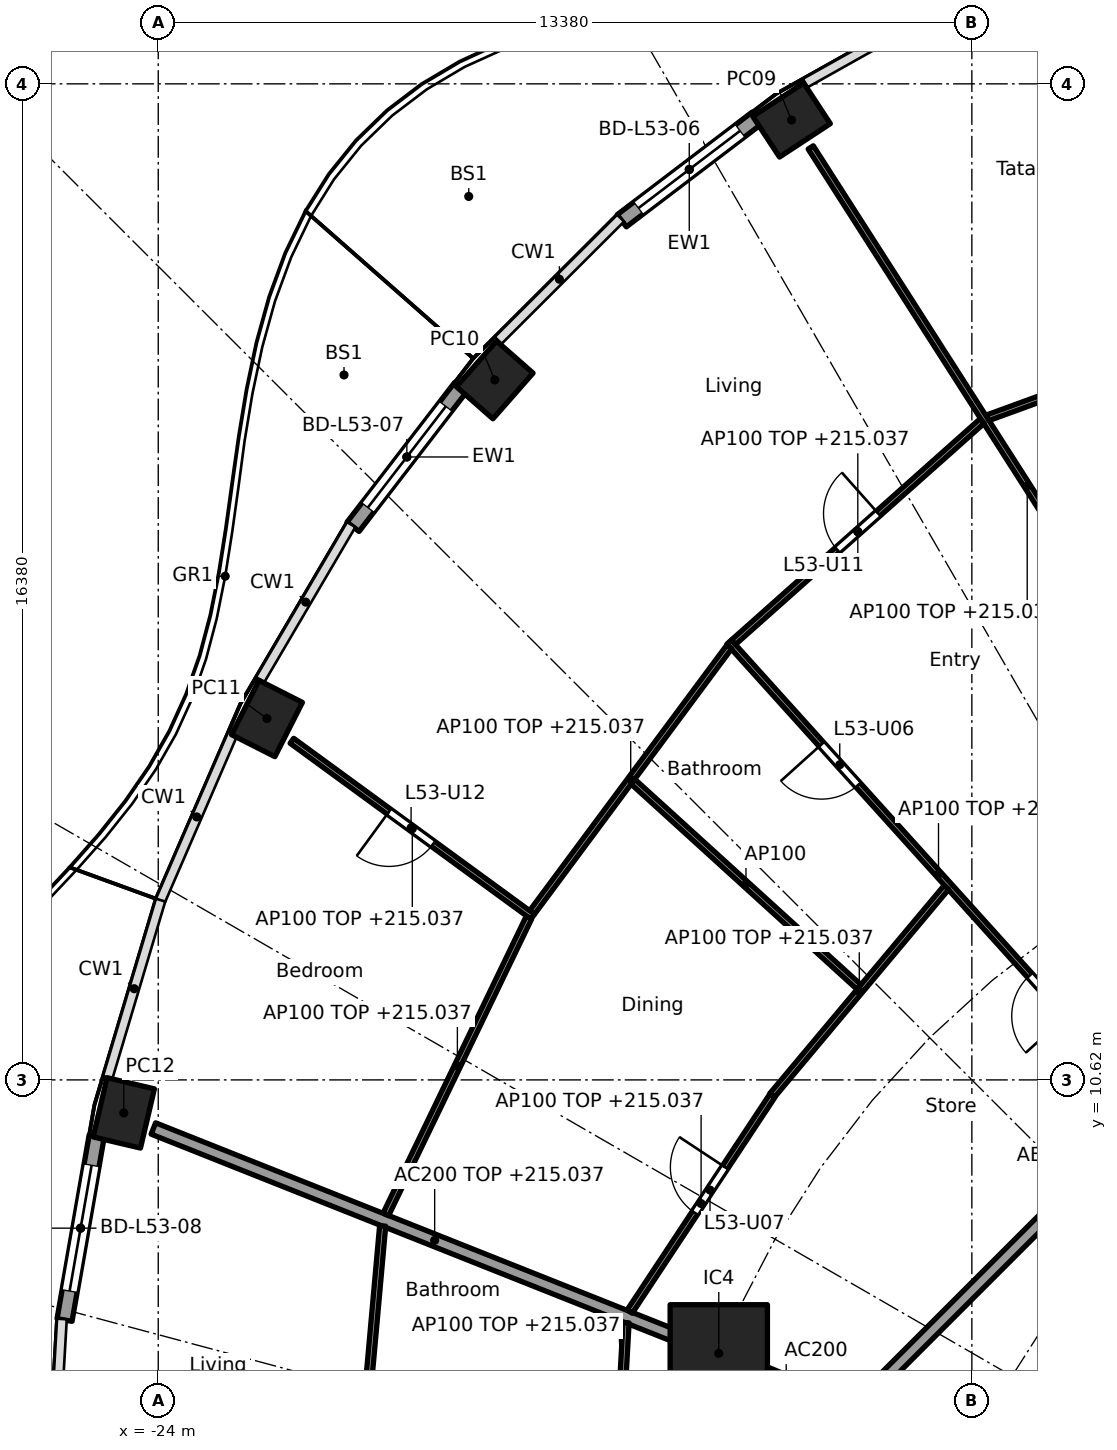
"""IFC4 building model, lengths in metres.
Left out: names, types, materials, properties, quantities, classifications, styles, units other than length and angle.
Written with IfcOpenShell. Run it as: python <this file> out.ifc"""

import sys

from ifc_helpers import new_model, si_unit, direction, frame, frame_2d, origin, origin_2d, place, context, subcontext, project, spatial, rectangle, hollow_rectangle, extrude, element, fill, save


model = new_model("IFC4")
c1 = context("Model", 3, precision=1e-05, world=origin(), true_north=direction((0.0, 1.0)))
c2 = subcontext(c1, "Body", "Model", "MODEL_VIEW")
j1 = project(units=[si_unit("LENGTHUNIT", "METRE"), si_unit("PLANEANGLEUNIT", "RADIAN")], contexts=[c1])
p1 = place(None, origin())
s1 = spatial("IfcSite", under=j1, at=p1, CompositionType="ELEMENT")
p2 = place(p1, origin())
s2 = spatial("IfcBuilding", under=s1, at=p2, CompositionType="ELEMENT")
p3 = place(p2, frame((0.0, 0.0, 212.2)))
s3 = spatial("IfcBuildingStorey", under=s2, at=p3, CompositionType="ELEMENT", Elevation=212.2)
for number, where, z_axis, x_axis in (
    (1, (-13.585, 26.405, -0.26), (0.0, 0.0, 1.0), (-0.836, -0.549, 0.0)),
    (2, (-18.467, 22.132, -0.26), (0.0, 0.0, 1.0), (-0.66, -0.751, 0.0)),
    (3, (-22.212, 16.563, -0.26), (0.0, 0.0, 1.0), (-0.452, -0.892, 0.0)),
    (4, (-24.567, 10.077, -0.26), (0.0, 0.0, 1.0), (-0.229, -0.973, 0.0)),
):
    element("IfcColumn", number, at=place(p3, frame(where, z_axis=z_axis, x_axis=x_axis)), inside=s3, PredefinedType="COLUMN", context=c2, shape_type="SweptSolid", body=[
        extrude(hollow_rectangle(XDim=1.0, YDim=0.8, WallThickness=0.032, at=origin_2d()), origin(), (0.0, 0.0, 1.0), 3.96),
    ])
p4 = place(p3, frame((-14.782, 6.123, 0.0), z_axis=(0.0, 0.0, 1.0), x_axis=(1.0, 0.0, 0.0)))
e5 = element("IfcColumn", 5, at=p4, inside=s3, PredefinedType="COLUMN", context=c2, shape_type="SweptSolid", body=[
    extrude(rectangle(XDim=1.6, YDim=1.6, at=origin_2d()), origin(), (0.0, 0.0, 1.0), 3.7),
])
p5 = place(p3, frame((-16.377, 24.748, 0.0), z_axis=(0.0, 0.0, 1.0), x_axis=(0.795990084031, 0.60530966135, 0.0)))
e6 = element("IfcWall", 6, at=p5, inside=s3, PredefinedType="SOLIDWALL", context=c2, shape_type="SweptSolid", body=[
    extrude(rectangle(XDim=2.789, YDim=0.25, at=frame_2d((1.394, 0.0))), origin(), (0.0, 0.0, 1.0), 3.44),
])
p6 = place(p5, frame((0.344, 0.0, 0.0)))
e7 = element("IfcOpeningElement", 7, at=p6, cuts=e6, PredefinedType="OPENING", context=c2, shape_type="SweptSolid", body=[
    extrude(rectangle(XDim=2.1, YDim=2.4, at=frame_2d((1.05, 1.2))), frame((0.0, 0.135, 0.0), z_axis=(0.0, -1.0, 0.0), x_axis=(1.0, 0.0, 0.0)), (0.0, 0.0, 1.0), 0.27),
])
p7 = place(p3, frame((-20.797, 19.715, 0.0), z_axis=(0.0, 0.0, 1.0), x_axis=(0.610438565676, 0.792063607001, 0.0)))
e8 = element("IfcWall", 8, at=p7, inside=s3, PredefinedType="SOLIDWALL", context=c2, shape_type="SweptSolid", body=[
    extrude(rectangle(XDim=2.901, YDim=0.25, at=frame_2d((1.45, 0.0))), origin(), (0.0, 0.0, 1.0), 3.44),
])
p8 = place(p7, frame((0.4, 0.0, 0.0)))
e9 = element("IfcOpeningElement", 9, at=p8, cuts=e8, PredefinedType="OPENING", context=c2, shape_type="SweptSolid", body=[
    extrude(rectangle(XDim=2.1, YDim=2.4, at=frame_2d((1.05, 1.2))), frame((0.0, 0.135, 0.0), z_axis=(0.0, -1.0, 0.0), x_axis=(1.0, 0.0, 0.0)), (0.0, 0.0, 1.0), 0.27),
])
p9 = place(p3, frame((-25.541, 6.671, 0.0), z_axis=(0.0, 0.0, 1.0), x_axis=(0.172254823677, 0.985052422828, 0.0)))
e10 = element("IfcWall", 10, at=p9, inside=s3, PredefinedType="SOLIDWALL", context=c2, shape_type="SweptSolid", body=[
    extrude(rectangle(XDim=3.067, YDim=0.25, at=frame_2d((1.534, 0.0))), origin(), (0.0, 0.0, 1.0), 3.44),
])
p10 = place(p9, frame((0.484, 0.0, 0.0)))
e11 = element("IfcOpeningElement", 11, at=p10, cuts=e10, PredefinedType="OPENING", context=c2, shape_type="SweptSolid", body=[
    extrude(rectangle(XDim=2.1, YDim=2.4, at=frame_2d((1.05, 1.2))), frame((0.0, 0.135, 0.0), z_axis=(0.0, -1.0, 0.0), x_axis=(1.0, 0.0, 0.0)), (0.0, 0.0, 1.0), 0.27),
])
p11 = place(p3, frame((-4.613, 9.988, 0.0), z_axis=(0.0, 0.0, 1.0), x_axis=(-0.707106781187, -0.707106781187, 0.0)))
e12 = element("IfcWall", 12, at=p11, inside=s3, PredefinedType="SHEAR", context=c2, shape_type="SweptSolid", body=[
    extrude(rectangle(XDim=7.602, YDim=0.6, at=frame_2d((3.801, 0.0))), origin(), (0.0, 0.0, 1.0), 3.44),
])
p12 = place(p11, frame((0.351, 0.0, 0.0)))
e13 = element("IfcOpeningElement", 13, at=p12, cuts=e12, PredefinedType="OPENING", context=c2, shape_type="SweptSolid", body=[
    extrude(rectangle(XDim=1.1, YDim=2.1, at=frame_2d((0.55, 1.05))), frame((0.0, 0.31, 0.0), z_axis=(0.0, -1.0, 0.0), x_axis=(1.0, 0.0, 0.0)), (0.0, 0.0, 1.0), 0.62),
])
p13 = place(p3, frame((-12.657, 5.243, 0.0), z_axis=(0.0, 0.0, 1.0), x_axis=(-0.923859888513, 0.38273085373, 0.0)))
e14 = element("IfcWall", 14, at=p13, inside=s3, PredefinedType="PARTITIONING", context=c2, shape_type="SweptSolid", body=[
    extrude(rectangle(XDim=2.199, YDim=0.2, at=frame_2d((1.1, 0.0))), origin(), (0.0, 0.0, 1.0), 3.44),
])
p14 = place(p3, frame((-14.829, 6.141, 0.0), z_axis=(0.0, 0.0, 1.0), x_axis=(-0.929202069098, 0.36957206981, 0.0)))
e15 = element("IfcWall", 15, at=p14, inside=s3, PredefinedType="PARTITIONING", context=c2, shape_type="SweptSolid", body=[
    extrude(rectangle(XDim=9.957, YDim=0.2, at=frame_2d((4.978, 0.0))), origin(), (0.0, 0.0, 1.0), 2.837),
])
p15 = place(p3, frame((-5.275, 12.494, 0.0), z_axis=(0.0, 0.0, 1.0), x_axis=(-0.707106781187, -0.707106781187, 0.0)))
e16 = element("IfcWall", 16, at=p15, inside=s3, PredefinedType="PARTITIONING", context=c2, shape_type="SweptSolid", body=[
    extrude(rectangle(XDim=10.209, YDim=0.2, at=frame_2d((5.104, 0.0))), origin(), (0.0, 0.0, 1.0), 3.44),
])
p16 = place(p15, frame((1.185, 0.0, 0.0)))
e17 = element("IfcOpeningElement", 17, at=p16, cuts=e16, PredefinedType="OPENING", context=c2, shape_type="SweptSolid", body=[
    extrude(rectangle(XDim=1.0, YDim=2.1, at=frame_2d((0.5, 1.05))), frame((0.0, 0.11, 0.0), z_axis=(0.0, -1.0, 0.0), x_axis=(1.0, 0.0, 0.0)), (0.0, 0.0, 1.0), 0.22),
])
p17 = place(p3, frame((-6.014, 23.094, 0.0), z_axis=(0.0, 0.0, 1.0), x_axis=(-0.939417400947, -0.342775359089, 0.0)))
e18 = element("IfcWall", 18, at=p17, inside=s3, PredefinedType="PARTITIONING", context=c2, shape_type="SweptSolid", body=[
    extrude(rectangle(XDim=4.633, YDim=0.1, at=frame_2d((2.316, 0.0))), origin(), (0.0, 0.0, 1.0), 2.837),
])
p18 = place(p3, frame((-6.15, 14.824, 0.0), z_axis=(0.0, 0.0, 1.0), x_axis=(-0.538870687577, 0.842388498301, 0.0)))
e19 = element("IfcWall", 19, at=p18, inside=s3, PredefinedType="PARTITIONING", context=c2, shape_type="SweptSolid", body=[
    extrude(rectangle(XDim=13.213, YDim=0.1, at=frame_2d((6.606, 0.0))), origin(), (0.0, 0.0, 1.0), 2.837),
])
p19 = place(p18, frame((1.483, 0.0, 0.0)))
e20 = element("IfcOpeningElement", 20, at=p19, cuts=e19, PredefinedType="OPENING", context=c2, shape_type="SweptSolid", body=[
    extrude(rectangle(XDim=0.9, YDim=2.1, at=frame_2d((0.45, 1.05))), frame((0.0, 0.06, 0.0), z_axis=(0.0, -1.0, 0.0), x_axis=(1.0, 0.0, 0.0)), (0.0, 0.0, 1.0), 0.12),
])
p20 = place(p3, frame((-10.45, 21.455, 0.0), z_axis=(0.0, 0.0, 1.0), x_axis=(-0.747150931973, -0.66465441009, 0.0)))
e21 = element("IfcWall", 21, at=p20, inside=s3, PredefinedType="PARTITIONING", context=c2, shape_type="SweptSolid", body=[
    extrude(rectangle(XDim=5.475, YDim=0.1, at=frame_2d((2.737, 0.0))), origin(), (0.0, 0.0, 1.0), 2.837),
])
p21 = place(p20, frame((2.288, 0.0, 0.0)))
e22 = element("IfcOpeningElement", 22, at=p21, cuts=e21, PredefinedType="OPENING", context=c2, shape_type="SweptSolid", body=[
    extrude(rectangle(XDim=0.9, YDim=2.1, at=frame_2d((0.45, 1.05))), frame((0.0, 0.06, 0.0), z_axis=(0.0, -1.0, 0.0), x_axis=(1.0, 0.0, 0.0)), (0.0, 0.0, 1.0), 0.12),
])
p22 = place(p3, frame((-7.725, 10.186, 0.0), z_axis=(0.0, 0.0, 1.0), x_axis=(-0.669819599194, 0.742523874725, 0.0)))
e23 = element("IfcWall", 23, at=p22, inside=s3, PredefinedType="PARTITIONING", context=c2, shape_type="SweptSolid", body=[
    extrude(rectangle(XDim=10.282, YDim=0.1, at=frame_2d((5.141, 0.0))), origin(), (0.0, 0.0, 1.0), 2.762),
])
p23 = place(p22, frame((2.0, 0.0, 0.0)))
e24 = element("IfcOpeningElement", 24, at=p23, cuts=e23, PredefinedType="OPENING", context=c2, shape_type="SweptSolid", body=[
    extrude(rectangle(XDim=0.9, YDim=2.1, at=frame_2d((0.45, 1.05))), frame((0.0, 0.06, 0.0), z_axis=(0.0, -1.0, 0.0), x_axis=(1.0, 0.0, 0.0)), (0.0, 0.0, 1.0), 0.12),
])
p24 = place(p22, frame((7.116, 0.0, 0.0)))
e25 = element("IfcOpeningElement", 25, at=p24, cuts=e23, PredefinedType="OPENING", context=c2, shape_type="SweptSolid", body=[
    extrude(rectangle(XDim=0.9, YDim=2.1, at=frame_2d((0.45, 1.05))), frame((0.0, 0.06, 0.0), z_axis=(0.0, -1.0, 0.0), x_axis=(1.0, 0.0, 0.0)), (0.0, 0.0, 1.0), 0.12),
])
p25 = place(p3, frame((-11.039, 13.785, 0.0), z_axis=(0.0, 0.0, 1.0), x_axis=(-0.642254625966, -0.766491353784, 0.0)))
e26 = element("IfcWall", 26, at=p25, inside=s3, PredefinedType="PARTITIONING", context=c2, shape_type="SweptSolid", body=[
    extrude(rectangle(XDim=4.461, YDim=0.1, at=frame_2d((2.23, 0.0))), origin(), (0.0, 0.0, 1.0), 2.837),
])
p26 = place(p3, frame((-14.608, 17.743, 0.0), z_axis=(0.0, 0.0, 1.0), x_axis=(-0.596174489482, -0.8028548923, 0.0)))
e27 = element("IfcWall", 27, at=p26, inside=s3, PredefinedType="PARTITIONING", context=c2, shape_type="SweptSolid", body=[
    extrude(rectangle(XDim=5.442, YDim=0.1, at=frame_2d((2.721, 0.0))), origin(), (0.0, 0.0, 1.0), 2.837),
])
p27 = place(p3, frame((-12.476, 12.147, 0.0), z_axis=(0.0, 0.0, 1.0), x_axis=(-0.740129203525, 0.672464692077, 0.0)))
e28 = element("IfcWall", 28, at=p27, inside=s3, PredefinedType="PARTITIONING", context=c2, shape_type="SweptSolid", body=[
    extrude(rectangle(XDim=5.022, YDim=0.1, at=frame_2d((2.511, 0.0))), origin(), (0.0, 0.0, 1.0), 3.44),
])
p28 = place(p3, frame((-13.899, 10.363, 0.0), z_axis=(0.0, 0.0, 1.0), x_axis=(-0.551267958114, -0.834328255758, 0.0)))
e29 = element("IfcWall", 29, at=p28, inside=s3, PredefinedType="PARTITIONING", context=c2, shape_type="SweptSolid", body=[
    extrude(rectangle(XDim=4.257, YDim=0.1, at=frame_2d((2.129, 0.0))), origin(), (0.0, 0.0, 1.0), 2.837),
])
p29 = place(p28, frame((1.413, 0.0, 0.0)))
e30 = element("IfcOpeningElement", 30, at=p29, cuts=e29, PredefinedType="OPENING", context=c2, shape_type="SweptSolid", body=[
    extrude(rectangle(XDim=0.9, YDim=2.1, at=frame_2d((0.45, 1.05))), frame((0.0, 0.06, 0.0), z_axis=(0.0, -1.0, 0.0), x_axis=(1.0, 0.0, 0.0)), (0.0, 0.0, 1.0), 0.12),
])
p30 = place(p3, frame((-17.842, 13.304, 0.0), z_axis=(0.0, 0.0, 1.0), x_axis=(-0.807541617862, 0.589810592835, 0.0)))
e31 = element("IfcWall", 31, at=p30, inside=s3, PredefinedType="PARTITIONING", context=c2, shape_type="SweptSolid", body=[
    extrude(rectangle(XDim=4.903, YDim=0.1, at=frame_2d((2.452, 0.0))), origin(), (0.0, 0.0, 1.0), 2.837),
])
p31 = place(p30, frame((2.027, 0.0, 0.0)))
e32 = element("IfcOpeningElement", 32, at=p31, cuts=e31, PredefinedType="OPENING", context=c2, shape_type="SweptSolid", body=[
    extrude(rectangle(XDim=0.9, YDim=2.1, at=frame_2d((0.45, 1.05))), frame((0.0, 0.06, 0.0), z_axis=(0.0, -1.0, 0.0), x_axis=(1.0, 0.0, 0.0)), (0.0, 0.0, 1.0), 0.12),
])
p32 = place(p3, frame((-17.904, 13.289, 0.0), z_axis=(0.0, 0.0, 1.0), x_axis=(-0.43429918566, -0.900768681369, 0.0)))
e33 = element("IfcWall", 33, at=p32, inside=s3, PredefinedType="PARTITIONING", context=c2, shape_type="SweptSolid", body=[
    extrude(rectangle(XDim=5.418, YDim=0.1, at=frame_2d((2.709, 0.0))), origin(), (0.0, 0.0, 1.0), 2.837),
])
p33 = place(p3, frame((-16.307, 6.627, 0.0), z_axis=(0.0, 0.0, 1.0), x_axis=(-0.055608865939, -0.998452629837, 0.0)))
e34 = element("IfcWall", 34, at=p33, inside=s3, PredefinedType="PARTITIONING", context=c2, shape_type="SweptSolid", body=[
    extrude(rectangle(XDim=2.143, YDim=0.1, at=frame_2d((1.071, 0.0))), origin(), (0.0, 0.0, 1.0), 2.837),
])
p34 = place(p3, frame((-20.31, 8.218, 0.0), z_axis=(0.0, 0.0, 1.0), x_axis=(-0.089284106956, -0.996006198899, 0.0)))
e35 = element("IfcWall", 35, at=p34, inside=s3, PredefinedType="PARTITIONING", context=c2, shape_type="SweptSolid", body=[
    extrude(rectangle(XDim=5.698, YDim=0.1, at=frame_2d((2.849, 0.0))), origin(), (0.0, 0.0, 1.0), 2.837),
])
p35 = place(p34, frame((3.761, 0.0, 0.0)))
e36 = element("IfcOpeningElement", 36, at=p35, cuts=e35, PredefinedType="OPENING", context=c2, shape_type="SweptSolid", body=[
    extrude(rectangle(XDim=0.9, YDim=2.1, at=frame_2d((0.45, 1.05))), frame((0.0, 0.06, 0.0), z_axis=(0.0, -1.0, 0.0), x_axis=(1.0, 0.0, 0.0)), (0.0, 0.0, 1.0), 0.12),
])
p36 = place(p6, origin())
e37 = element("IfcDoor", 37, at=p36, inside=s3, OperationType="SLIDING_TO_LEFT", PredefinedType="DOOR", context=c2, shape_type="SweptSolid", body=[
    extrude(rectangle(XDim=2.1, YDim=2.4, at=frame_2d((1.05, 1.2))), frame((0.0, 0.025, 0.0), z_axis=(0.0, -1.0, 0.0), x_axis=(1.0, 0.0, 0.0)), (0.0, 0.0, 1.0), 0.05),
])
fill(e7, e37)
p37 = place(p8, origin())
e38 = element("IfcDoor", 38, at=p37, inside=s3, OperationType="SLIDING_TO_LEFT", PredefinedType="DOOR", context=c2, shape_type="SweptSolid", body=[
    extrude(rectangle(XDim=2.1, YDim=2.4, at=frame_2d((1.05, 1.2))), frame((0.0, 0.025, 0.0), z_axis=(0.0, -1.0, 0.0), x_axis=(1.0, 0.0, 0.0)), (0.0, 0.0, 1.0), 0.05),
])
fill(e9, e38)
p38 = place(p10, origin())
e39 = element("IfcDoor", 39, at=p38, inside=s3, OperationType="SLIDING_TO_LEFT", PredefinedType="DOOR", context=c2, shape_type="SweptSolid", body=[
    extrude(rectangle(XDim=2.1, YDim=2.4, at=frame_2d((1.05, 1.2))), frame((0.0, 0.025, 0.0), z_axis=(0.0, -1.0, 0.0), x_axis=(1.0, 0.0, 0.0)), (0.0, 0.0, 1.0), 0.05),
])
fill(e11, e39)
p39 = place(p23, origin())
e40 = element("IfcDoor", 40, at=p39, inside=s3, OperationType="SINGLE_SWING_LEFT", PredefinedType="DOOR", context=c2, shape_type="SweptSolid", body=[
    extrude(rectangle(XDim=0.9, YDim=2.1, at=frame_2d((0.45, 1.05))), frame((0.0, 0.025, 0.0), z_axis=(0.0, -1.0, 0.0), x_axis=(1.0, 0.0, 0.0)), (0.0, 0.0, 1.0), 0.05),
])
fill(e24, e40)
p40 = place(p24, origin())
e41 = element("IfcDoor", 41, at=p40, inside=s3, OperationType="SINGLE_SWING_RIGHT", PredefinedType="DOOR", context=c2, shape_type="SweptSolid", body=[
    extrude(rectangle(XDim=0.9, YDim=2.1, at=frame_2d((0.45, 1.05))), frame((0.0, 0.025, 0.0), z_axis=(0.0, -1.0, 0.0), x_axis=(1.0, 0.0, 0.0)), (0.0, 0.0, 1.0), 0.05),
])
fill(e25, e41)
p41 = place(p29, frame((0.9, 0.0, 0.0), x_axis=(-1.0, 0.0, 0.0)))
e42 = element("IfcDoor", 42, at=p41, inside=s3, OperationType="SINGLE_SWING_RIGHT", PredefinedType="DOOR", context=c2, shape_type="SweptSolid", body=[
    extrude(rectangle(XDim=0.9, YDim=2.1, at=frame_2d((0.45, 1.05))), frame((0.0, 0.025, 0.0), z_axis=(0.0, -1.0, 0.0), x_axis=(1.0, 0.0, 0.0)), (0.0, 0.0, 1.0), 0.05),
])
fill(e30, e42)
p42 = place(p21, frame((0.9, 0.0, 0.0), x_axis=(-1.0, 0.0, 0.0)))
e43 = element("IfcDoor", 43, at=p42, inside=s3, OperationType="SINGLE_SWING_RIGHT", PredefinedType="DOOR", context=c2, shape_type="SweptSolid", body=[
    extrude(rectangle(XDim=0.9, YDim=2.1, at=frame_2d((0.45, 1.05))), frame((0.0, 0.025, 0.0), z_axis=(0.0, -1.0, 0.0), x_axis=(1.0, 0.0, 0.0)), (0.0, 0.0, 1.0), 0.05),
])
fill(e22, e43)
p43 = place(p31, origin())
e44 = element("IfcDoor", 44, at=p43, inside=s3, OperationType="SINGLE_SWING_RIGHT", PredefinedType="DOOR", context=c2, shape_type="SweptSolid", body=[
    extrude(rectangle(XDim=0.9, YDim=2.1, at=frame_2d((0.45, 1.05))), frame((0.0, 0.025, 0.0), z_axis=(0.0, -1.0, 0.0), x_axis=(1.0, 0.0, 0.0)), (0.0, 0.0, 1.0), 0.05),
])
fill(e32, e44)
save(model, sys.argv[1])
